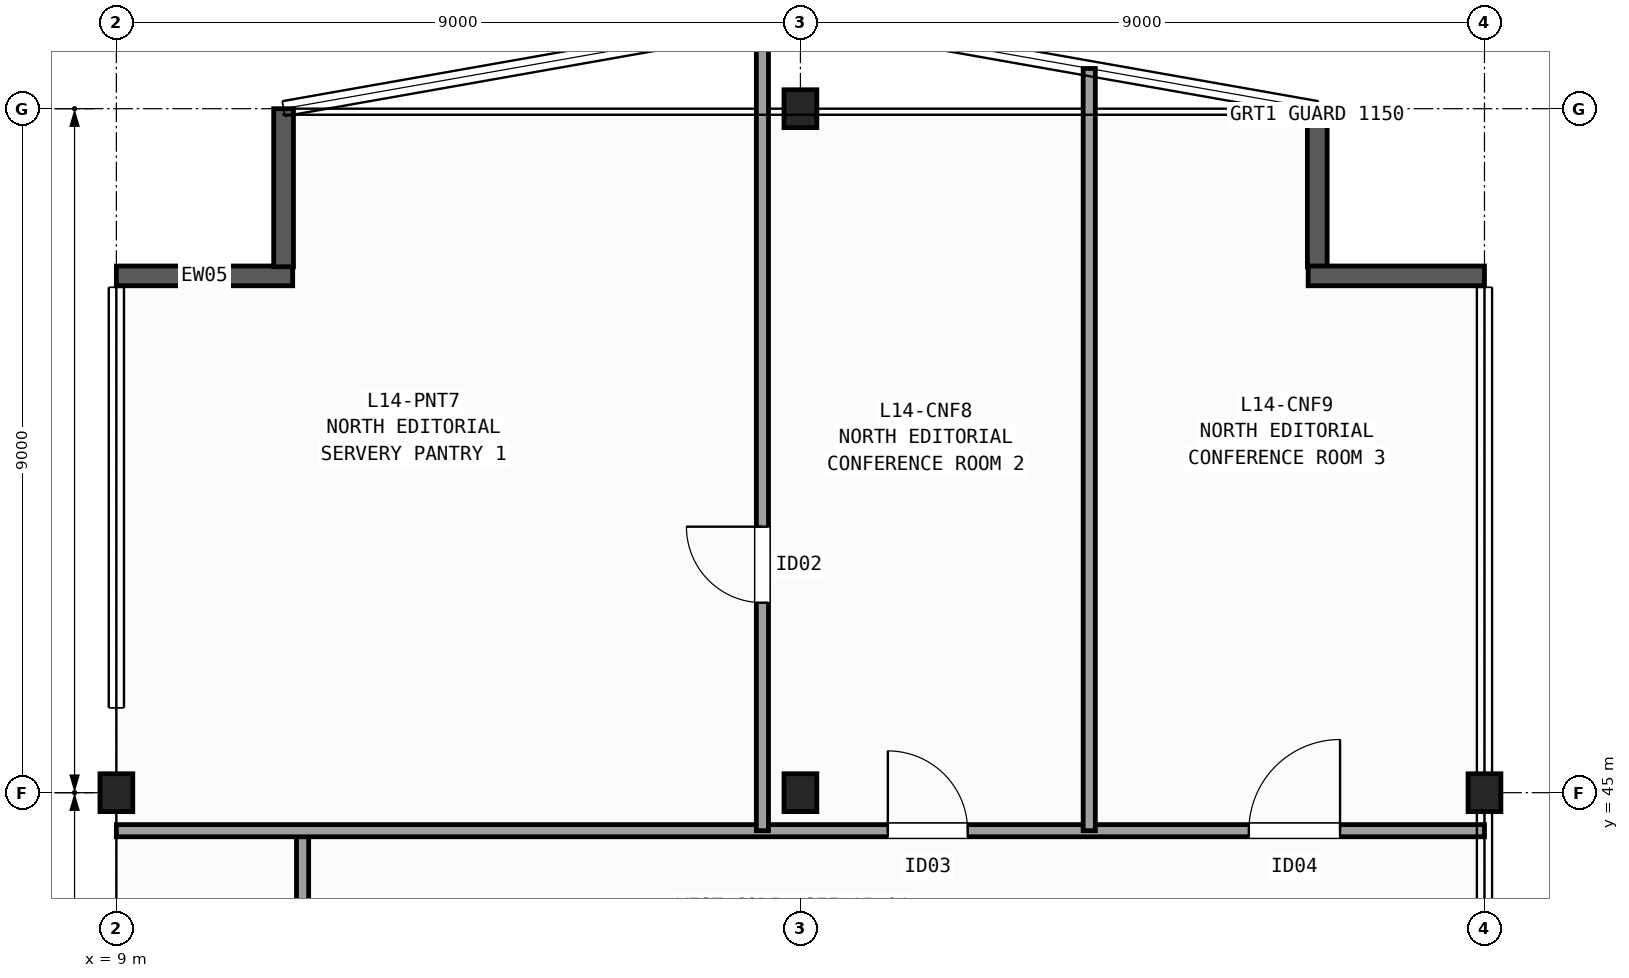
"""IFC4 building model, lengths in metres.
Left out: names, types, materials, properties, quantities, classifications, styles, units other than length and angle.
Written with IfcOpenShell. Run it as: python <this file> out.ifc"""

import sys

from ifc_helpers import new_model, si_unit, direction, frame, frame_2d, origin, origin_2d, place, context, subcontext, project, spatial, rectangle, i_section, extrude, element, fill, save


model = new_model("IFC4")
c1 = context("Model", 3, precision=1e-05, world=origin(), true_north=direction((0.0, 1.0)))
c2 = subcontext(c1, "Body", "Model", "MODEL_VIEW")
j1 = project(units=[si_unit("LENGTHUNIT", "METRE"), si_unit("PLANEANGLEUNIT", "RADIAN")], contexts=[c1])
p1 = place(None, origin())
s1 = spatial("IfcSite", under=j1, at=p1, CompositionType="ELEMENT")
p2 = place(p1, origin())
s2 = spatial("IfcBuilding", under=s1, at=p2, CompositionType="ELEMENT")
p3 = place(p2, frame((0.0, 0.0, 61.9)))
s3 = spatial("IfcBuildingStorey", under=s2, at=p3, CompositionType="ELEMENT", Elevation=61.9)
for number, where, z_axis, x_axis in (
    (1, (9.0, 45.0, 0.0), (0.0, 0.0, 1.0), (1.0, 0.0, 0.0)),
    (2, (18.0, 45.0, 0.0), (0.0, 0.0, 1.0), (1.0, 0.0, 0.0)),
    (3, (18.0, 54.0, 0.0), (0.0, 0.0, 1.0), (1.0, 0.0, 0.0)),
    (4, (27.0, 45.0, 0.0), (0.0, 0.0, 1.0), (1.0, 0.0, 0.0)),
):
    element("IfcColumn", number, at=place(p3, frame(where, z_axis=z_axis, x_axis=x_axis)), inside=s3, PredefinedType="COLUMN", context=c2, shape_type="SweptSolid", body=[
        extrude(i_section(OverallWidth=0.432, OverallDepth=0.498, WebThickness=0.056, FlangeThickness=0.089, FilletRadius=0.015, at=origin_2d()), origin(), (0.0, 0.0, 1.0), 3.7),
    ])
p4 = place(p3, frame((9.0, 51.8, 0.0), z_axis=(0.0, 0.0, 1.0), x_axis=(1.0, 0.0, 0.0)))
e5 = element("IfcWall", 5, at=p4, inside=s3, PredefinedType="SOLIDWALL", context=c2, shape_type="SweptSolid", body=[
    extrude(rectangle(XDim=2.32, YDim=0.26, at=frame_2d((1.16, 0.0))), origin(), (0.0, 0.0, 1.0), 3.42),
])
for number, where, z_axis, x_axis in (
    (6, (11.2, 51.92, 0.0), (0.0, 0.0, 1.0), (0.0, 1.0, 0.0)),
    (7, (24.8, 54.0, 0.0), (0.0, 0.0, 1.0), (0.0, -1.0, 0.0)),
):
    element("IfcWall", number, at=place(p3, frame(where, z_axis=z_axis, x_axis=x_axis)), inside=s3, PredefinedType="SOLIDWALL", context=c2, shape_type="SweptSolid", body=[
        extrude(rectangle(XDim=2.08, YDim=0.26, at=frame_2d((1.04, 0.0))), origin(), (0.0, 0.0, 1.0), 3.42),
    ])
p5 = place(p3, frame((24.68, 51.8, 0.0), z_axis=(0.0, 0.0, 1.0), x_axis=(1.0, 0.0, 0.0)))
e8 = element("IfcWall", 8, at=p5, inside=s3, PredefinedType="SOLIDWALL", context=c2, shape_type="SweptSolid", body=[
    extrude(rectangle(XDim=2.32, YDim=0.26, at=frame_2d((1.16, 0.0))), origin(), (0.0, 0.0, 1.0), 3.42),
])
p6 = place(p3, frame((11.45, 42.4, 0.0), z_axis=(0.0, 0.0, 1.0), x_axis=(0.0, 1.0, 0.0)))
e9 = element("IfcWall", 9, at=p6, inside=s3, PredefinedType="PARTITIONING", context=c2, shape_type="SweptSolid", body=[
    extrude(rectangle(XDim=2.1, YDim=0.16, at=frame_2d((1.05, 0.0))), origin(), (0.0, 0.0, 1.0), 3.42),
])
p7 = place(p3, frame((9.0, 44.5, 0.0), z_axis=(0.0, 0.0, 1.0), x_axis=(1.0, 0.0, 0.0)))
e10 = element("IfcWall", 10, at=p7, inside=s3, PredefinedType="PARTITIONING", context=c2, shape_type="SweptSolid", body=[
    extrude(rectangle(XDim=18.0, YDim=0.16, at=frame_2d((9.0, 0.0))), origin(), (0.0, 0.0, 1.0), 2.627),
])
p8 = place(p7, frame((10.15, 0.0, 0.0)))
e11 = element("IfcOpeningElement", 11, at=p8, cuts=e10, PredefinedType="OPENING", context=c2, shape_type="SweptSolid", body=[
    extrude(rectangle(XDim=1.05, YDim=2.15, at=frame_2d((0.525, 1.075))), frame((0.0, 0.09, 0.0), z_axis=(0.0, -1.0, 0.0), x_axis=(1.0, 0.0, 0.0)), (0.0, 0.0, 1.0), 0.18),
])
p9 = place(p7, frame((14.9, 0.0, 0.0)))
e12 = element("IfcOpeningElement", 12, at=p9, cuts=e10, PredefinedType="OPENING", context=c2, shape_type="SweptSolid", body=[
    extrude(rectangle(XDim=1.2, YDim=2.15, at=frame_2d((0.6, 1.075))), frame((0.0, 0.09, 0.0), z_axis=(0.0, -1.0, 0.0), x_axis=(1.0, 0.0, 0.0)), (0.0, 0.0, 1.0), 0.18),
])
p10 = place(p3, frame((17.5, 44.5, 0.0), z_axis=(0.0, 0.0, 1.0), x_axis=(0.0, 1.0, 0.0)))
e13 = element("IfcWall", 13, at=p10, inside=s3, PredefinedType="PARTITIONING", context=c2, shape_type="SweptSolid", body=[
    extrude(rectangle(XDim=10.612, YDim=0.16, at=frame_2d((5.306, 0.0))), origin(), (0.0, 0.0, 1.0), 3.42),
])
p11 = place(p10, frame((3.0, 0.0, 0.0)))
e14 = element("IfcOpeningElement", 14, at=p11, cuts=e13, PredefinedType="OPENING", context=c2, shape_type="SweptSolid", body=[
    extrude(rectangle(XDim=1.0, YDim=2.1, at=frame_2d((0.5, 1.05))), frame((0.0, 0.09, 0.0), z_axis=(0.0, -1.0, 0.0), x_axis=(1.0, 0.0, 0.0)), (0.0, 0.0, 1.0), 0.18),
])
p12 = place(p3, frame((21.8, 44.5, 0.0), z_axis=(0.0, 0.0, 1.0), x_axis=(0.0, 1.0, 0.0)))
e15 = element("IfcWall", 15, at=p12, inside=s3, PredefinedType="PARTITIONING", context=c2, shape_type="SweptSolid", body=[
    extrude(rectangle(XDim=10.029, YDim=0.16, at=frame_2d((5.015, 0.0))), origin(), (0.0, 0.0, 1.0), 3.42),
])
p13 = place(p11, origin())
e16 = element("IfcDoor", 16, at=p13, inside=s3, OperationType="SINGLE_SWING_RIGHT", PredefinedType="DOOR", context=c2, shape_type="SweptSolid", body=[
    extrude(rectangle(XDim=1.0, YDim=2.1, at=frame_2d((0.5, 1.05))), frame((0.0, 0.025, 0.0), z_axis=(0.0, -1.0, 0.0), x_axis=(1.0, 0.0, 0.0)), (0.0, 0.0, 1.0), 0.05),
])
fill(e14, e16)
p14 = place(p8, origin())
e17 = element("IfcDoor", 17, at=p14, inside=s3, OperationType="SINGLE_SWING_LEFT", PredefinedType="DOOR", context=c2, shape_type="SweptSolid", body=[
    extrude(rectangle(XDim=1.05, YDim=2.15, at=frame_2d((0.525, 1.075))), frame((0.0, 0.025, 0.0), z_axis=(0.0, -1.0, 0.0), x_axis=(1.0, 0.0, 0.0)), (0.0, 0.0, 1.0), 0.05),
])
fill(e11, e17)
p15 = place(p9, origin())
e18 = element("IfcDoor", 18, at=p15, inside=s3, OperationType="SINGLE_SWING_RIGHT", PredefinedType="DOOR", context=c2, shape_type="SweptSolid", body=[
    extrude(rectangle(XDim=1.2, YDim=2.15, at=frame_2d((0.6, 1.075))), frame((0.0, 0.025, 0.0), z_axis=(0.0, -1.0, 0.0), x_axis=(1.0, 0.0, 0.0)), (0.0, 0.0, 1.0), 0.05),
])
fill(e12, e18)
save(model, sys.argv[1])
